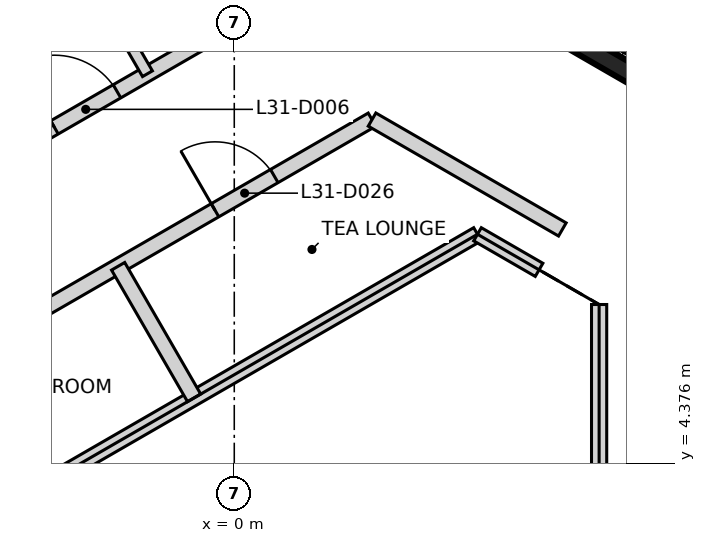
"""IFC4 building model, lengths in metres.
Left out: names, types, materials, properties, quantities, classifications, styles, units other than length and angle.
Written with IfcOpenShell. Run it as: python <this file> out.ifc"""

import sys

from ifc_helpers import new_model, si_unit, direction, frame, frame_2d, origin, place, context, subcontext, project, spatial, rectangle, extrude, element, fill, save


model = new_model("IFC4")
c1 = context("Model", 3, precision=1e-05, world=origin(), true_north=direction((0.0, 1.0)))
c2 = subcontext(c1, "Body", "Model", "MODEL_VIEW")
j1 = project(units=[si_unit("LENGTHUNIT", "METRE"), si_unit("PLANEANGLEUNIT", "RADIAN")], contexts=[c1])
p1 = place(None, origin())
s1 = spatial("IfcSite", under=j1, at=p1, CompositionType="ELEMENT")
p2 = place(p1, origin())
s2 = spatial("IfcBuilding", under=s1, at=p2, CompositionType="ELEMENT")
p3 = place(p2, frame((0.0, 0.0, 128.8)))
s3 = spatial("IfcBuildingStorey", under=s2, at=p3, CompositionType="ELEMENT", Elevation=128.8)
p4 = place(p3, frame((10.42, 6.498, 0.0), z_axis=(0.0, 0.0, 1.0), x_axis=(-0.866021906294, 0.500006057782, 0.0)))
e1 = element("IfcWall", 1, at=p4, inside=s3, PredefinedType="SHEAR", context=c2, shape_type="SweptSolid", body=[
    extrude(rectangle(XDim=11.55, YDim=0.25, at=frame_2d((5.775, 0.0))), origin(), (0.0, 0.0, 1.0), 3.2),
])
p5 = place(p4, frame((10.025, 0.0, 0.0)))
e2 = element("IfcOpeningElement", 2, at=p5, cuts=e1, PredefinedType="OPENING", context=c2, shape_type="SweptSolid", body=[
    extrude(rectangle(XDim=1.2, YDim=2.1, at=frame_2d((0.6, 1.05))), frame((0.0, 0.135, 0.0), z_axis=(0.0, -1.0, 0.0), x_axis=(1.0, 0.0, 0.0)), (0.0, 0.0, 1.0), 0.27),
])
p6 = place(p4, frame((8.725, 0.0, 0.0)))
e3 = element("IfcOpeningElement", 3, at=p6, cuts=e1, PredefinedType="OPENING", context=c2, shape_type="SweptSolid", body=[
    extrude(rectangle(XDim=1.2, YDim=2.1, at=frame_2d((0.6, 1.05))), frame((0.0, 0.135, 0.0), z_axis=(0.0, -1.0, 0.0), x_axis=(1.0, 0.0, 0.0)), (0.0, 0.0, 1.0), 0.27),
])
p7 = place(p3, frame((-8.613, 2.881, 0.0), z_axis=(0.0, 0.0, 1.0), x_axis=(0.866103179807, 0.499865263774, 0.0)))
e4 = element("IfcWall", 4, at=p7, inside=s3, PredefinedType="PARTITIONING", context=c2, shape_type="SweptSolid", body=[
    extrude(rectangle(XDim=12.036, YDim=0.2, at=frame_2d((6.018, 0.0))), origin(), (0.0, 0.0, 1.0), 3.2),
])
p8 = place(p7, frame((9.652, 0.0, 0.0)))
e5 = element("IfcOpeningElement", 5, at=p8, cuts=e4, PredefinedType="OPENING", context=c2, shape_type="SweptSolid", body=[
    extrude(rectangle(XDim=0.9, YDim=2.1, at=frame_2d((0.45, 1.05))), frame((0.0, 0.11, 0.0), z_axis=(0.0, -1.0, 0.0), x_axis=(1.0, 0.0, 0.0)), (0.0, 0.0, 1.0), 0.22),
])
p9 = place(p7, frame((3.646, 0.0, 0.0)))
e6 = element("IfcOpeningElement", 6, at=p9, cuts=e4, PredefinedType="OPENING", context=c2, shape_type="SweptSolid", body=[
    extrude(rectangle(XDim=0.9, YDim=2.1, at=frame_2d((0.45, 1.05))), frame((0.0, 0.11, 0.0), z_axis=(0.0, -1.0, 0.0), x_axis=(1.0, 0.0, 0.0)), (0.0, 0.0, 1.0), 0.22),
])
p10 = place(p3, frame((-7.862, 5.624, 0.0), z_axis=(0.0, 0.0, 1.0), x_axis=(0.866109024618, 0.499855136491, 0.0)))
e7 = element("IfcWall", 7, at=p10, inside=s3, PredefinedType="PARTITIONING", context=c2, shape_type="SweptSolid", body=[
    extrude(rectangle(XDim=9.61, YDim=0.2, at=frame_2d((4.805, 0.0))), origin(), (0.0, 0.0, 1.0), 3.2),
])
p11 = place(p10, frame((6.345, 0.0, 0.0)))
e8 = element("IfcOpeningElement", 8, at=p11, cuts=e7, PredefinedType="OPENING", context=c2, shape_type="SweptSolid", body=[
    extrude(rectangle(XDim=0.95, YDim=2.1, at=frame_2d((0.475, 1.05))), frame((0.0, 0.11, 0.0), z_axis=(0.0, -1.0, 0.0), x_axis=(1.0, 0.0, 0.0)), (0.0, 0.0, 1.0), 0.22),
])
p12 = place(p10, frame((5.02, 0.0, 0.0)))
e9 = element("IfcOpeningElement", 9, at=p12, cuts=e7, PredefinedType="OPENING", context=c2, shape_type="SweptSolid", body=[
    extrude(rectangle(XDim=0.95, YDim=2.1, at=frame_2d((0.475, 1.05))), frame((0.0, 0.11, 0.0), z_axis=(0.0, -1.0, 0.0), x_axis=(1.0, 0.0, 0.0)), (0.0, 0.0, 1.0), 0.22),
])
p13 = place(p3, frame((1.813, 8.899, 0.0), z_axis=(0.0, 0.0, 1.0), x_axis=(0.865957732194, -0.50011719232, 0.0)))
e10 = element("IfcWall", 10, at=p13, inside=s3, PredefinedType="PARTITIONING", context=c2, shape_type="SweptSolid", body=[
    extrude(rectangle(XDim=2.891, YDim=0.2, at=frame_2d((1.445, 0.0))), origin(), (0.0, 0.0, 1.0), 2.3),
])
p14 = place(p3, frame((-8.0, 0.924, 0.0), z_axis=(0.0, 0.0, 1.0), x_axis=(0.86604129137, 0.499972480886, 0.0)))
e11 = element("IfcWall", 11, at=p14, inside=s3, PredefinedType="PARTITIONING", context=c2, shape_type="SweptSolid", body=[
    extrude(rectangle(XDim=12.932, YDim=0.2, at=frame_2d((6.466, 0.0))), origin(), (0.0, 0.0, 1.0), 2.3),
])
p15 = place(p3, frame((-1.528, 6.969, 0.0), z_axis=(0.0, 0.0, 1.0), x_axis=(0.500000846469, -0.866024915075, 0.0)))
e12 = element("IfcWall", 12, at=p15, inside=s3, PredefinedType="PARTITIONING", context=c2, shape_type="SweptSolid", body=[
    extrude(rectangle(XDim=1.999, YDim=0.2, at=frame_2d((1.0, 0.0))), origin(), (0.0, 0.0, 1.0), 3.2),
])
p16 = place(p3, frame((3.2, 7.39, 0.0), z_axis=(0.0, 0.0, 1.0), x_axis=(0.865985641702, -0.500068863623, 0.0)))
e13 = element("IfcWall", 13, at=p16, inside=s3, PredefinedType="PARTITIONING", context=c2, shape_type="SweptSolid", body=[
    extrude(rectangle(XDim=0.935, YDim=0.2, at=frame_2d((0.468, 0.0))), origin(), (0.0, 0.0, 1.0), 2.3),
])
p17 = place(p3, frame((4.8, -6.466, 0.0), z_axis=(0.0, 0.0, 1.0), x_axis=(0.0, 1.0, 0.0)))
e14 = element("IfcWall", 14, at=p17, inside=s3, PredefinedType="PARTITIONING", context=c2, shape_type="SweptSolid", body=[
    extrude(rectangle(XDim=12.932, YDim=0.2, at=frame_2d((6.466, 0.0))), origin(), (0.0, 0.0, 1.0), 2.3),
])
p18 = place(p3, frame((-2.391, 11.665, 0.0), z_axis=(0.0, 0.0, 1.0), x_axis=(0.500049599607, -0.865996765544, 0.0)))
e15 = element("IfcWall", 15, at=p18, inside=s3, PredefinedType="PARTITIONING", context=c2, shape_type="SweptSolid", body=[
    extrude(rectangle(XDim=2.498, YDim=0.15, at=frame_2d((1.249, 0.0))), origin(), (0.0, 0.0, 1.0), 3.2),
])
p19 = place(p18, frame((0.848, 0.0, 0.0)))
e16 = element("IfcOpeningElement", 16, at=p19, cuts=e15, PredefinedType="OPENING", context=c2, shape_type="SweptSolid", body=[
    extrude(rectangle(XDim=0.8, YDim=2.1, at=frame_2d((0.4, 1.05))), frame((0.0, 0.085, 0.0), z_axis=(0.0, -1.0, 0.0), x_axis=(1.0, 0.0, 0.0)), (0.0, 0.0, 1.0), 0.17),
])
p20 = place(p11, origin())
e17 = element("IfcDoor", 17, at=p20, inside=s3, OperationType="SINGLE_SWING_LEFT", PredefinedType="DOOR", context=c2, shape_type="SweptSolid", body=[
    extrude(rectangle(XDim=0.95, YDim=2.1, at=frame_2d((0.475, 1.05))), frame((0.0, 0.025, 0.0), z_axis=(0.0, -1.0, 0.0), x_axis=(1.0, 0.0, 0.0)), (0.0, 0.0, 1.0), 0.05),
])
fill(e8, e17)
p21 = place(p8, frame((0.9, 0.0, 0.0), z_axis=(0.0, 0.0, 1.0), x_axis=(-1.0, 0.0, 0.0)))
e18 = element("IfcDoor", 18, at=p21, inside=s3, OperationType="SINGLE_SWING_LEFT", PredefinedType="DOOR", context=c2, shape_type="SweptSolid", body=[
    extrude(rectangle(XDim=0.9, YDim=2.1, at=frame_2d((0.45, 1.05))), frame((0.0, 0.025, 0.0), z_axis=(0.0, -1.0, 0.0), x_axis=(1.0, 0.0, 0.0)), (0.0, 0.0, 1.0), 0.05),
])
fill(e5, e18)
save(model, sys.argv[1])
